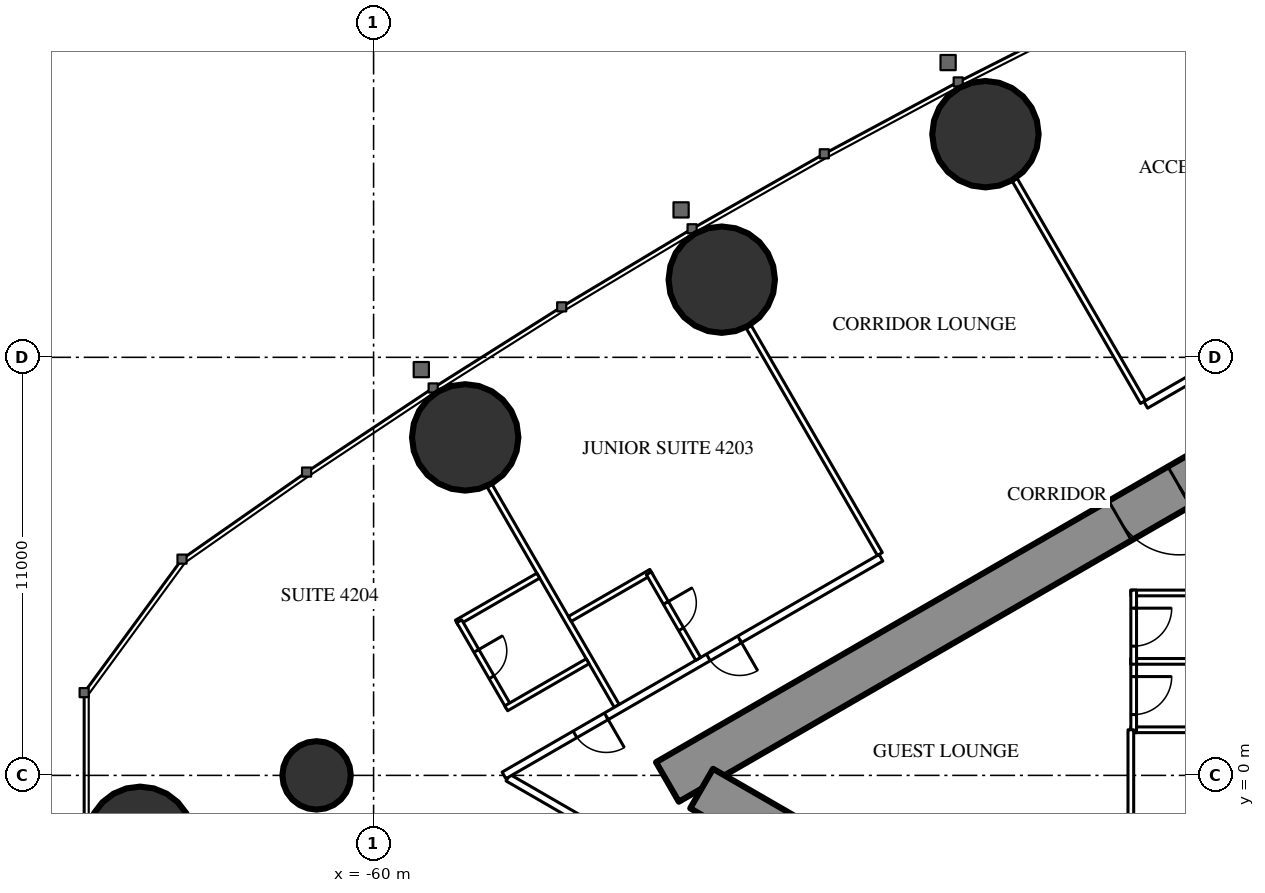
"""IFC4 building model, lengths in metres.
Left out: names, types, materials, properties, quantities, classifications, styles, units other than length and angle.
Written with IfcOpenShell. Run it as: python <this file> out.ifc"""

import sys

from ifc_helpers import new_model, si_unit, direction, frame, frame_2d, origin, origin_2d, place, context, subcontext, project, spatial, rectangle, circle, extrude, element, fill, save


model = new_model("IFC4")
c1 = context("Model", 3, precision=1e-05, world=origin(), true_north=direction((0.0, 1.0)))
c2 = subcontext(c1, "Body", "Model", "MODEL_VIEW")
j1 = project(units=[si_unit("LENGTHUNIT", "METRE"), si_unit("PLANEANGLEUNIT", "RADIAN")], contexts=[c1])
p1 = place(None, origin())
s1 = spatial("IfcSite", under=j1, at=p1, CompositionType="ELEMENT")
p2 = place(p1, origin())
s2 = spatial("IfcBuilding", under=s1, at=p2, CompositionType="ELEMENT")
p3 = place(p2, frame((0.0, 0.0, 159.8)))
s3 = spatial("IfcBuildingStorey", under=s2, at=p3, CompositionType="ELEMENT", Elevation=159.8)
for number, where, z_axis, x_axis in (
    (1, (-66.143, -1.695, 0.0), (0.0, 0.0, 1.0), (1.0, 0.0, 0.0)),
    (2, (-43.9, 16.871, 0.0), (0.0, 0.0, 1.0), (1.0, 0.0, 0.0)),
    (3, (-50.839, 13.043, 0.0), (0.0, 0.0, 1.0), (1.0, 0.0, 0.0)),
    (4, (-57.59, 8.893, 0.0), (0.0, 0.0, 1.0), (1.0, 0.0, 0.0)),
):
    element("IfcColumn", number, at=place(p3, frame(where, z_axis=z_axis, x_axis=x_axis)), inside=s3, PredefinedType="COLUMN", context=c2, shape_type="SweptSolid", body=[
        extrude(circle(Radius=1.4, at=origin_2d()), origin(), (0.0, 0.0, 1.0), 3.5),
    ])
p4 = place(p3, frame((-61.5, 0.0, 0.0), z_axis=(0.0, 0.0, 1.0), x_axis=(1.0, 0.0, 0.0)))
e5 = element("IfcColumn", 5, at=p4, inside=s3, PredefinedType="COLUMN", context=c2, shape_type="SweptSolid", body=[
    extrude(circle(Radius=0.9, at=origin_2d()), origin(), (0.0, 0.0, 1.0), 3.5),
])
p5 = place(p3, frame((-27.2, 14.3, 0.0), z_axis=(0.0, 0.0, 1.0), x_axis=(-0.866026593062, -0.499997940104, 0.0)))
e6 = element("IfcWall", 6, at=p5, inside=s3, PredefinedType="SHEAR", context=c2, shape_type="SweptSolid", body=[
    extrude(rectangle(XDim=28.946, YDim=1.2, at=frame_2d((14.473, 0.0))), origin(), (0.0, 0.0, 1.0), 3.5),
])
p6 = place(p5, frame((4.6, 0.0, 0.0)))
e7 = element("IfcOpeningElement", 7, at=p6, cuts=e6, PredefinedType="OPENING", context=c2, shape_type="SweptSolid", body=[
    extrude(rectangle(XDim=1.0, YDim=2.2, at=frame_2d((0.5, 1.1))), frame((0.0, 0.61, 0.0), z_axis=(0.0, -1.0, 0.0), x_axis=(1.0, 0.0, 0.0)), (0.0, 0.0, 1.0), 1.22),
])
p7 = place(p5, frame((13.395, 0.0, 0.0)))
e8 = element("IfcOpeningElement", 8, at=p7, cuts=e6, PredefinedType="OPENING", context=c2, shape_type="SweptSolid", body=[
    extrude(rectangle(XDim=1.8, YDim=2.2, at=frame_2d((0.9, 1.1))), frame((0.0, 0.61, 0.0), z_axis=(0.0, -1.0, 0.0), x_axis=(1.0, 0.0, 0.0)), (0.0, 0.0, 1.0), 1.22),
])
p8 = place(p3, frame((-27.2, -14.3, 0.0), z_axis=(0.0, 0.0, 1.0), x_axis=(-0.866024021859, 0.500002393557, 0.0)))
e9 = element("IfcWall", 9, at=p8, inside=s3, PredefinedType="SHEAR", context=c2, shape_type="SweptSolid", body=[
    extrude(rectangle(XDim=27.907, YDim=1.2, at=frame_2d((13.954, 0.0))), origin(), (0.0, 0.0, 1.0), 3.5),
])
p9 = place(p8, frame((4.6, 0.0, 0.0)))
e10 = element("IfcOpeningElement", 10, at=p9, cuts=e9, PredefinedType="OPENING", context=c2, shape_type="SweptSolid", body=[
    extrude(rectangle(XDim=1.0, YDim=2.2, at=frame_2d((0.5, 1.1))), frame((0.0, 0.61, 0.0), z_axis=(0.0, -1.0, 0.0), x_axis=(1.0, 0.0, 0.0)), (0.0, 0.0, 1.0), 1.22),
])
p10 = place(p8, frame((13.395, 0.0, 0.0)))
e11 = element("IfcOpeningElement", 11, at=p10, cuts=e9, PredefinedType="OPENING", context=c2, shape_type="SweptSolid", body=[
    extrude(rectangle(XDim=1.8, YDim=2.2, at=frame_2d((0.9, 1.1))), frame((0.0, 0.61, 0.0), z_axis=(0.0, -1.0, 0.0), x_axis=(1.0, 0.0, 0.0)), (0.0, 0.0, 1.0), 1.22),
])
p11 = place(p3, frame((-39.754, 9.823, 0.0), z_axis=(0.0, 0.0, 1.0), x_axis=(-0.499997670926, 0.866026748472, 0.0)))
e12 = element("IfcWall", 12, at=p11, inside=s3, PredefinedType="PARTITIONING", context=c2, shape_type="SweptSolid", body=[
    extrude(rectangle(XDim=6.757, YDim=0.15, at=frame_2d((3.379, 0.0))), origin(), (0.0, 0.0, 1.0), 2.3),
])
p12 = place(p3, frame((-46.679, 5.825, 0.0), z_axis=(0.0, 0.0, 1.0), x_axis=(-0.500006839597, 0.866021454905, 0.0)))
e13 = element("IfcWall", 13, at=p12, inside=s3, PredefinedType="PARTITIONING", context=c2, shape_type="SweptSolid", body=[
    extrude(rectangle(XDim=6.911, YDim=0.15, at=frame_2d((3.456, 0.0))), origin(), (0.0, 0.0, 1.0), 2.3),
])
p13 = place(p3, frame((-53.602, 1.828, 0.0), z_axis=(0.0, 0.0, 1.0), x_axis=(-0.49999191814, 0.866030069798, 0.0)))
e14 = element("IfcWall", 14, at=p13, inside=s3, PredefinedType="PARTITIONING", context=c2, shape_type="SweptSolid", body=[
    extrude(rectangle(XDim=6.692, YDim=0.15, at=frame_2d((3.346, 0.0))), origin(), (0.0, 0.0, 1.0), 2.3),
])
p14 = place(p3, frame((-44.715, -6.844, 0.0), z_axis=(0.0, 0.0, 1.0), x_axis=(-0.866025261224, 0.500000246922, 0.0)))
e15 = element("IfcWall", 15, at=p14, inside=s3, PredefinedType="PARTITIONING", context=c2, shape_type="SweptSolid", body=[
    extrude(rectangle(XDim=13.567, YDim=0.2, at=frame_2d((6.783, 0.0))), origin(), (0.0, 0.0, 1.0), 3.25),
])
p15 = place(p14, frame((10.579, 0.0, 0.0)))
e16 = element("IfcOpeningElement", 16, at=p15, cuts=e15, PredefinedType="OPENING", context=c2, shape_type="SweptSolid", body=[
    extrude(rectangle(XDim=0.95, YDim=2.2, at=frame_2d((0.475, 1.1))), frame((0.0, 0.11, 0.0), z_axis=(0.0, -1.0, 0.0), x_axis=(1.0, 0.0, 0.0)), (0.0, 0.0, 1.0), 0.22),
])
p16 = place(p14, frame((8.879, 0.0, 0.0)))
e17 = element("IfcOpeningElement", 17, at=p16, cuts=e15, PredefinedType="OPENING", context=c2, shape_type="SweptSolid", body=[
    extrude(rectangle(XDim=0.95, YDim=2.2, at=frame_2d((0.475, 1.1))), frame((0.0, 0.11, 0.0), z_axis=(0.0, -1.0, 0.0), x_axis=(1.0, 0.0, 0.0)), (0.0, 0.0, 1.0), 0.22),
])
p17 = place(p14, frame((0.5, 0.0, 0.0)))
e18 = element("IfcOpeningElement", 18, at=p17, cuts=e15, PredefinedType="OPENING", context=c2, shape_type="SweptSolid", body=[
    extrude(rectangle(XDim=1.435, YDim=2.2, at=frame_2d((0.718, 1.1))), frame((0.0, 0.11, 0.0), z_axis=(0.0, -1.0, 0.0), x_axis=(1.0, 0.0, 0.0)), (0.0, 0.0, 1.0), 0.22),
])
p18 = place(p3, frame((-27.86, 16.575, 0.0), z_axis=(0.0, 0.0, 1.0), x_axis=(-0.866026850238, -0.499997494661, 0.0)))
e19 = element("IfcWall", 19, at=p18, inside=s3, PredefinedType="PARTITIONING", context=c2, shape_type="SweptSolid", body=[
    extrude(rectangle(XDim=13.651, YDim=0.2, at=frame_2d((6.826, 0.0))), origin(), (0.0, 0.0, 1.0), 3.25),
])
p19 = place(p18, frame((3.75, 0.0, 0.0)))
e20 = element("IfcOpeningElement", 20, at=p19, cuts=e19, PredefinedType="OPENING", context=c2, shape_type="SweptSolid", body=[
    extrude(rectangle(XDim=1.0, YDim=2.2, at=frame_2d((0.5, 1.1))), frame((0.0, 0.11, 0.0), z_axis=(0.0, -1.0, 0.0), x_axis=(1.0, 0.0, 0.0)), (0.0, 0.0, 1.0), 0.22),
])
p20 = place(p3, frame((-46.65, 5.726, 0.0), z_axis=(0.0, 0.0, 1.0), x_axis=(-0.866027963864, -0.499995565786, 0.0)))
e21 = element("IfcWall", 21, at=p20, inside=s3, PredefinedType="PARTITIONING", context=c2, shape_type="SweptSolid", body=[
    extrude(rectangle(XDim=11.452, YDim=0.2, at=frame_2d((5.726, 0.0))), origin(), (0.0, 0.0, 1.0), 3.25),
])
p21 = place(p20, frame((4.294, 0.0, 0.0)))
e22 = element("IfcOpeningElement", 22, at=p21, cuts=e21, PredefinedType="OPENING", context=c2, shape_type="SweptSolid", body=[
    extrude(rectangle(XDim=0.95, YDim=2.2, at=frame_2d((0.475, 1.1))), frame((0.0, 0.11, 0.0), z_axis=(0.0, -1.0, 0.0), x_axis=(1.0, 0.0, 0.0)), (0.0, 0.0, 1.0), 0.22),
])
p22 = place(p20, frame((8.344, 0.0, 0.0)))
e23 = element("IfcOpeningElement", 23, at=p22, cuts=e21, PredefinedType="OPENING", context=c2, shape_type="SweptSolid", body=[
    extrude(rectangle(XDim=0.95, YDim=2.2, at=frame_2d((0.475, 1.1))), frame((0.0, 0.11, 0.0), z_axis=(0.0, -1.0, 0.0), x_axis=(1.0, 0.0, 0.0)), (0.0, 0.0, 1.0), 0.22),
])
p23 = place(p3, frame((-52.694, 5.355, 0.0), z_axis=(0.0, 0.0, 1.0), x_axis=(-0.866031185235, -0.4999899861, 0.0)))
e24 = element("IfcWall", 24, at=p23, inside=s3, PredefinedType="PARTITIONING", context=c2, shape_type="SweptSolid", body=[
    extrude(rectangle(XDim=2.475, YDim=0.15, at=frame_2d((1.238, 0.0))), origin(), (0.0, 0.0, 1.0), 3.25),
])
p24 = place(p3, frame((-51.459, 3.065, 0.0), z_axis=(0.0, 0.0, 1.0), x_axis=(-0.499936506574, 0.866062058628, 0.0)))
e25 = element("IfcWall", 25, at=p24, inside=s3, PredefinedType="PARTITIONING", context=c2, shape_type="SweptSolid", body=[
    extrude(rectangle(XDim=2.6, YDim=0.15, at=frame_2d((1.3, 0.0))), origin(), (0.0, 0.0, 1.0), 3.25),
])
p25 = place(p24, frame((0.9, 0.0, 0.0)))
e26 = element("IfcOpeningElement", 26, at=p25, cuts=e25, PredefinedType="OPENING", context=c2, shape_type="SweptSolid", body=[
    extrude(rectangle(XDim=0.8, YDim=2.2, at=frame_2d((0.4, 1.1))), frame((0.0, 0.085, 0.0), z_axis=(0.0, -1.0, 0.0), x_axis=(1.0, 0.0, 0.0)), (0.0, 0.0, 1.0), 0.17),
])
p26 = place(p3, frame((-55.667, 5.255, 0.0), z_axis=(0.0, 0.0, 1.0), x_axis=(-0.866006523861, -0.500032699561, 0.0)))
e27 = element("IfcWall", 27, at=p26, inside=s3, PredefinedType="PARTITIONING", context=c2, shape_type="SweptSolid", body=[
    extrude(rectangle(XDim=2.475, YDim=0.15, at=frame_2d((1.237, 0.0))), origin(), (0.0, 0.0, 1.0), 3.25),
])
p27 = place(p3, frame((-56.446, 1.803, 0.0), z_axis=(0.0, 0.0, 1.0), x_axis=(-0.499936506574, 0.866062058628, 0.0)))
e28 = element("IfcWall", 28, at=p27, inside=s3, PredefinedType="PARTITIONING", context=c2, shape_type="SweptSolid", body=[
    extrude(rectangle(XDim=2.6, YDim=0.15, at=frame_2d((1.3, 0.0))), origin(), (0.0, 0.0, 1.0), 3.25),
])
p28 = place(p27, frame((0.9, 0.0, 0.0)))
e29 = element("IfcOpeningElement", 29, at=p28, cuts=e28, PredefinedType="OPENING", context=c2, shape_type="SweptSolid", body=[
    extrude(rectangle(XDim=0.8, YDim=2.2, at=frame_2d((0.4, 1.1))), frame((0.0, 0.085, 0.0), z_axis=(0.0, -1.0, 0.0), x_axis=(1.0, 0.0, 0.0)), (0.0, 0.0, 1.0), 0.17),
])
p29 = place(p3, frame((-54.367, 3.003, 0.0), z_axis=(0.0, 0.0, 1.0), x_axis=(-0.866031185235, -0.4999899861, 0.0)))
e30 = element("IfcWall", 30, at=p29, inside=s3, PredefinedType="PARTITIONING", context=c2, shape_type="SweptSolid", body=[
    extrude(rectangle(XDim=2.475, YDim=0.15, at=frame_2d((1.238, 0.0))), origin(), (0.0, 0.0, 1.0), 3.25),
])
for number, where, z_axis, x_axis in (
    (31, (-37.9, 1.2, 0.0), (0.0, 0.0, 1.0), (-1.0, 0.0, 0.0)),
    (32, (-37.9, 3.0, 0.0), (0.0, 0.0, 1.0), (-1.0, 0.0, 0.0)),
    (33, (-37.9, 4.8, 0.0), (0.0, 0.0, 1.0), (-1.0, 0.0, 0.0)),
):
    element("IfcWall", number, at=place(p3, frame(where, z_axis=z_axis, x_axis=x_axis)), inside=s3, PredefinedType="PARTITIONING", context=c2, shape_type="SweptSolid", body=[
        extrude(rectangle(XDim=2.175, YDim=0.15, at=frame_2d((1.087, 0.0))), origin(), (0.0, 0.0, 1.0), 3.25),
    ])
p30 = place(p3, frame((-40.0, 3.075, 0.0), z_axis=(0.0, 0.0, 1.0), x_axis=(0.0, -1.0, 0.0)))
e34 = element("IfcWall", 34, at=p30, inside=s3, PredefinedType="PARTITIONING", context=c2, shape_type="SweptSolid", body=[
    extrude(rectangle(XDim=1.95, YDim=0.15, at=frame_2d((0.975, 0.0))), origin(), (0.0, 0.0, 1.0), 3.25),
])
p31 = place(p30, frame((0.475, 0.0, 0.0)))
e35 = element("IfcOpeningElement", 35, at=p31, cuts=e34, PredefinedType="OPENING", context=c2, shape_type="SweptSolid", body=[
    extrude(rectangle(XDim=1.0, YDim=2.2, at=frame_2d((0.5, 1.1))), frame((0.0, 0.085, 0.0), z_axis=(0.0, -1.0, 0.0), x_axis=(1.0, 0.0, 0.0)), (0.0, 0.0, 1.0), 0.17),
])
p32 = place(p3, frame((-40.0, 4.875, 0.0), z_axis=(0.0, 0.0, 1.0), x_axis=(0.0, -1.0, 0.0)))
e36 = element("IfcWall", 36, at=p32, inside=s3, PredefinedType="PARTITIONING", context=c2, shape_type="SweptSolid", body=[
    extrude(rectangle(XDim=1.95, YDim=0.15, at=frame_2d((0.975, 0.0))), origin(), (0.0, 0.0, 1.0), 3.25),
])
p33 = place(p32, frame((0.475, 0.0, 0.0)))
e37 = element("IfcOpeningElement", 37, at=p33, cuts=e36, PredefinedType="OPENING", context=c2, shape_type="SweptSolid", body=[
    extrude(rectangle(XDim=1.0, YDim=2.2, at=frame_2d((0.5, 1.1))), frame((0.0, 0.085, 0.0), z_axis=(0.0, -1.0, 0.0), x_axis=(1.0, 0.0, 0.0)), (0.0, 0.0, 1.0), 0.17),
])
p34 = place(p3, frame((-40.075, 1.2, 0.0), z_axis=(0.0, 0.0, 1.0), x_axis=(0.0, -1.0, 0.0)))
e38 = element("IfcWall", 38, at=p34, inside=s3, PredefinedType="PARTITIONING", context=c2, shape_type="SweptSolid", body=[
    extrude(rectangle(XDim=7.374, YDim=0.15, at=frame_2d((3.687, 0.0))), origin(), (0.0, 0.0, 1.0), 3.25),
])
p35 = place(p34, frame((2.787, 0.0, 0.0)))
e39 = element("IfcOpeningElement", 39, at=p35, cuts=e38, PredefinedType="OPENING", context=c2, shape_type="SweptSolid", body=[
    extrude(rectangle(XDim=1.8, YDim=2.2, at=frame_2d((0.9, 1.1))), frame((0.0, 0.085, 0.0), z_axis=(0.0, -1.0, 0.0), x_axis=(1.0, 0.0, 0.0)), (0.0, 0.0, 1.0), 0.17),
])
p36 = place(p25, origin())
e40 = element("IfcDoor", 40, at=p36, inside=s3, OperationType="SINGLE_SWING_RIGHT", PredefinedType="DOOR", context=c2, shape_type="SweptSolid", body=[
    extrude(rectangle(XDim=0.8, YDim=2.2, at=frame_2d((0.4, 1.1))), frame((0.0, 0.025, 0.0), z_axis=(0.0, -1.0, 0.0), x_axis=(1.0, 0.0, 0.0)), (0.0, 0.0, 1.0), 0.05),
])
fill(e26, e40)
p37 = place(p21, origin())
e41 = element("IfcDoor", 41, at=p37, inside=s3, OperationType="SINGLE_SWING_LEFT", PredefinedType="DOOR", context=c2, shape_type="SweptSolid", body=[
    extrude(rectangle(XDim=0.95, YDim=2.2, at=frame_2d((0.475, 1.1))), frame((0.0, 0.025, 0.0), z_axis=(0.0, -1.0, 0.0), x_axis=(1.0, 0.0, 0.0)), (0.0, 0.0, 1.0), 0.05),
])
fill(e22, e41)
p38 = place(p28, origin())
e42 = element("IfcDoor", 42, at=p38, inside=s3, OperationType="SINGLE_SWING_RIGHT", PredefinedType="DOOR", context=c2, shape_type="SweptSolid", body=[
    extrude(rectangle(XDim=0.8, YDim=2.2, at=frame_2d((0.4, 1.1))), frame((0.0, 0.025, 0.0), z_axis=(0.0, -1.0, 0.0), x_axis=(1.0, 0.0, 0.0)), (0.0, 0.0, 1.0), 0.05),
])
fill(e29, e42)
p39 = place(p22, origin())
e43 = element("IfcDoor", 43, at=p39, inside=s3, OperationType="SINGLE_SWING_LEFT", PredefinedType="DOOR", context=c2, shape_type="SweptSolid", body=[
    extrude(rectangle(XDim=0.95, YDim=2.2, at=frame_2d((0.475, 1.1))), frame((0.0, 0.025, 0.0), z_axis=(0.0, -1.0, 0.0), x_axis=(1.0, 0.0, 0.0)), (0.0, 0.0, 1.0), 0.05),
])
fill(e23, e43)
p40 = place(p31, origin())
e44 = element("IfcDoor", 44, at=p40, inside=s3, OperationType="SINGLE_SWING_LEFT", PredefinedType="DOOR", context=c2, shape_type="SweptSolid", body=[
    extrude(rectangle(XDim=1.0, YDim=2.2, at=frame_2d((0.5, 1.1))), frame((0.0, 0.025, 0.0), z_axis=(0.0, -1.0, 0.0), x_axis=(1.0, 0.0, 0.0)), (0.0, 0.0, 1.0), 0.05),
])
fill(e35, e44)
p41 = place(p33, origin())
e45 = element("IfcDoor", 45, at=p41, inside=s3, OperationType="SINGLE_SWING_LEFT", PredefinedType="DOOR", context=c2, shape_type="SweptSolid", body=[
    extrude(rectangle(XDim=1.0, YDim=2.2, at=frame_2d((0.5, 1.1))), frame((0.0, 0.025, 0.0), z_axis=(0.0, -1.0, 0.0), x_axis=(1.0, 0.0, 0.0)), (0.0, 0.0, 1.0), 0.05),
])
fill(e37, e45)
p42 = place(p7, origin())
e46 = element("IfcDoor", 46, at=p42, inside=s3, OperationType="DOUBLE_DOOR_SINGLE_SWING", PredefinedType="DOOR", context=c2, shape_type="SweptSolid", body=[
    extrude(rectangle(XDim=1.8, YDim=2.2, at=frame_2d((0.9, 1.1))), frame((0.0, 0.025, 0.0), z_axis=(0.0, -1.0, 0.0), x_axis=(1.0, 0.0, 0.0)), (0.0, 0.0, 1.0), 0.05),
])
fill(e8, e46)
save(model, sys.argv[1])
